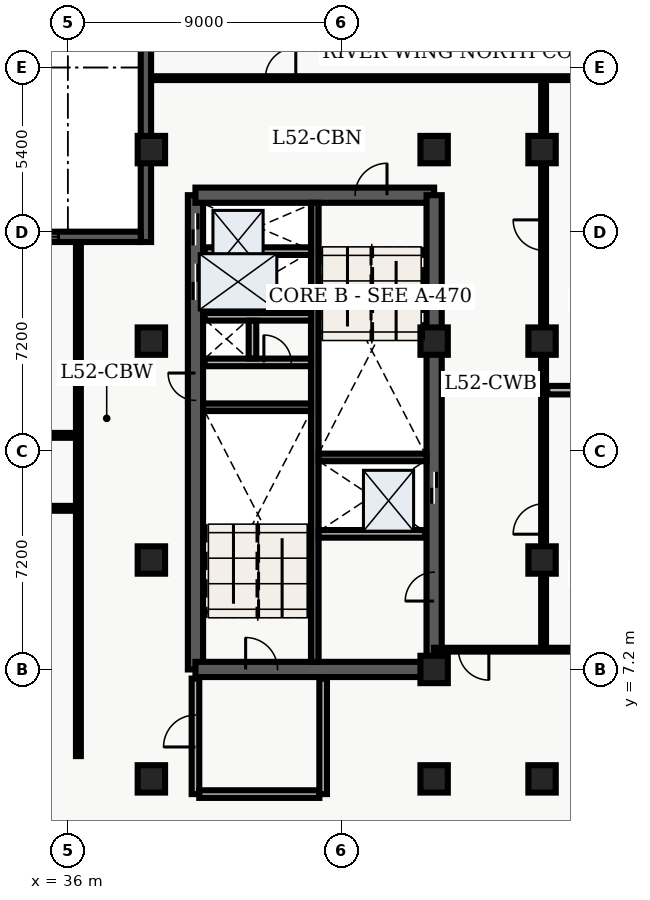
"""IFC4 building model, lengths in metres.
Left out: names, types, materials, properties, quantities, classifications, styles, units other than length and angle.
Written with IfcOpenShell. Run it as: python <this file> out.ifc"""

import sys

from ifc_helpers import new_model, entity, si_unit, converted_unit, direction, frame, origin_with_axes, origin_2d_with_axis, place, context, subcontext, project, spatial, polyline, rectangle, outline, extrude, element, fill, save


model = new_model("IFC4")
c1 = context("Model", 3, precision=1e-05, world=origin_with_axes(), true_north=direction((0.0, 1.0)))
c2 = subcontext(c1, "Body", "Model", "MODEL_VIEW")
j1 = project(units=[si_unit("LENGTHUNIT", "METRE"), converted_unit("PLANEANGLEUNIT", "DEGREE", entity("IfcPlaneAngleMeasure", 0.017), si_unit("PLANEANGLEUNIT", "RADIAN"), dimensions=[0, 0, 0, 0, 0, 0, 0])], contexts=[c1])
p1 = place(None, origin_with_axes())
s1 = spatial("IfcSite", under=j1, at=p1, CompositionType="ELEMENT")
p2 = place(p1, origin_with_axes())
s2 = spatial("IfcBuilding", under=s1, at=p2, CompositionType="ELEMENT")
p3 = place(p2, frame((0.0, 0.0, 212.1), z_axis=(0.0, 0.0, 1.0), x_axis=(1.0, 0.0, 0.0)))
s3 = spatial("IfcBuildingStorey", under=s2, at=p3, CompositionType="ELEMENT", Elevation=212.1)
p4 = place(p3, frame((40.2, 7.2, 0.0), z_axis=(0.0, 0.0, 1.0), x_axis=(0.0, 1.0, 0.0)))
e1 = element("IfcWall", 1, at=p4, inside=s3, PredefinedType="SHEAR", context=c2, shape_type="SweptSolid", body=[
    extrude(outline(polyline([(0.0, -0.25), (15.6, -0.25), (15.6, 0.25), (0.0, 0.25), (0.0, -0.25)])), origin_with_axes(), (0.0, 0.0, 1.0), 3.66),
])
p5 = place(p4, frame((14.475, 0.0, 0.0), z_axis=(0.0, 0.0, 1.0), x_axis=(1.0, 0.0, 0.0)))
e2 = element("IfcOpeningElement", 2, at=p5, cuts=e1, PredefinedType="OPENING", context=c2, shape_type="SweptSolid", body=[
    extrude(rectangle(XDim=1.05, YDim=0.52, at=origin_2d_with_axis()), origin_with_axes(), (0.0, 0.0, 1.0), 2.15),
])
p6 = place(p4, frame((12.75, 0.0, 0.0), z_axis=(0.0, 0.0, 1.0), x_axis=(1.0, 0.0, 0.0)))
e3 = element("IfcOpeningElement", 3, at=p6, cuts=e1, PredefinedType="OPENING", context=c2, shape_type="SweptSolid", body=[
    extrude(rectangle(XDim=1.2, YDim=0.52, at=origin_2d_with_axis()), origin_with_axes(), (0.0, 0.0, 1.0), 2.15),
])
p7 = place(p4, frame((9.3, 0.0, 0.0), z_axis=(0.0, 0.0, 1.0), x_axis=(1.0, 0.0, 0.0)))
e4 = element("IfcOpeningElement", 4, at=p7, cuts=e1, PredefinedType="OPENING", context=c2, shape_type="SweptSolid", body=[
    extrude(rectangle(XDim=0.9, YDim=0.52, at=origin_2d_with_axis()), origin_with_axes(), (0.0, 0.0, 1.0), 2.15),
])
p8 = place(p3, frame((40.2, 7.2, 0.0), z_axis=(0.0, 0.0, 1.0), x_axis=(1.0, 0.0, 0.0)))
e5 = element("IfcWall", 5, at=p8, inside=s3, PredefinedType="SHEAR", context=c2, shape_type="SweptSolid", body=[
    extrude(outline(polyline([(0.0, -0.25), (7.85, -0.25), (7.85, 0.25), (0.0, 0.25), (0.0, -0.25)])), origin_with_axes(), (0.0, 0.0, 1.0), 3.66),
])
p9 = place(p8, frame((2.175, 0.0, 0.0), z_axis=(0.0, 0.0, 1.0), x_axis=(1.0, 0.0, 0.0)))
e6 = element("IfcOpeningElement", 6, at=p9, cuts=e5, PredefinedType="OPENING", context=c2, shape_type="SweptSolid", body=[
    extrude(rectangle(XDim=1.05, YDim=0.52, at=origin_2d_with_axis()), origin_with_axes(), (0.0, 0.0, 1.0), 2.15),
])
p10 = place(p3, frame((40.2, 22.8, 0.0), z_axis=(0.0, 0.0, 1.0), x_axis=(1.0, 0.0, 0.0)))
e7 = element("IfcWall", 7, at=p10, inside=s3, PredefinedType="SHEAR", context=c2, shape_type="SweptSolid", body=[
    extrude(outline(polyline([(0.0, -0.25), (7.85, -0.25), (7.85, 0.25), (0.0, 0.25), (0.0, -0.25)])), origin_with_axes(), (0.0, 0.0, 1.0), 3.66),
])
p11 = place(p10, frame((5.775, 0.0, 0.0), z_axis=(0.0, 0.0, 1.0), x_axis=(1.0, 0.0, 0.0)))
e8 = element("IfcOpeningElement", 8, at=p11, cuts=e7, PredefinedType="OPENING", context=c2, shape_type="SweptSolid", body=[
    extrude(rectangle(XDim=1.05, YDim=0.52, at=origin_2d_with_axis()), origin_with_axes(), (0.0, 0.0, 1.0), 2.15),
])
p12 = place(p3, frame((48.05, 7.2, 0.0), z_axis=(0.0, 0.0, 1.0), x_axis=(0.0, 1.0, 0.0)))
e9 = element("IfcWall", 9, at=p12, inside=s3, PredefinedType="SHEAR", context=c2, shape_type="SweptSolid", body=[
    extrude(outline(polyline([(0.0, -0.25), (15.6, -0.25), (15.6, 0.25), (0.0, 0.25), (0.0, -0.25)])), origin_with_axes(), (0.0, 0.0, 1.0), 3.66),
])
p13 = place(p12, frame((5.975, 0.0, 0.0), z_axis=(0.0, 0.0, 1.0), x_axis=(1.0, 0.0, 0.0)))
e10 = element("IfcOpeningElement", 10, at=p13, cuts=e9, PredefinedType="OPENING", context=c2, shape_type="SweptSolid", body=[
    extrude(rectangle(XDim=1.05, YDim=0.52, at=origin_2d_with_axis()), origin_with_axes(), (0.0, 0.0, 1.0), 2.15),
])
p14 = place(p12, frame((2.725, 0.0, 0.0), z_axis=(0.0, 0.0, 1.0), x_axis=(1.0, 0.0, 0.0)))
e11 = element("IfcOpeningElement", 11, at=p14, cuts=e9, PredefinedType="OPENING", context=c2, shape_type="SweptSolid", body=[
    extrude(rectangle(XDim=0.95, YDim=0.52, at=origin_2d_with_axis()), origin_with_axes(), (0.0, 0.0, 1.0), 2.15),
])
p15 = place(p3, frame((44.125, 7.45, 0.0), z_axis=(0.0, 0.0, 1.0), x_axis=(0.0, 1.0, 0.0)))
e12 = element("IfcWall", 12, at=p15, inside=s3, PredefinedType="SHEAR", context=c2, shape_type="SweptSolid", body=[
    extrude(outline(polyline([(0.0, -0.125), (15.1, -0.125), (15.1, 0.125), (0.0, 0.125), (0.0, -0.125)])), origin_with_axes(), (0.0, 0.0, 1.0), 3.66),
])
for number, where, z_axis, x_axis in (
    (13, (40.45, 15.825, 0.0), (0.0, 0.0, 1.0), (1.0, 0.0, 0.0)),
    (14, (44.25, 14.175, 0.0), (0.0, 0.0, 1.0), (1.0, 0.0, 0.0)),
):
    element("IfcWall", number, at=place(p3, frame(where, z_axis=z_axis, x_axis=x_axis)), inside=s3, PredefinedType="SHEAR", context=c2, shape_type="SweptSolid", body=[
        extrude(outline(polyline([(0.0, -0.125), (3.55, -0.125), (3.55, 0.125), (0.0, 0.125), (0.0, -0.125)])), origin_with_axes(), (0.0, 0.0, 1.0), 3.66),
    ])
p16 = place(p3, frame((40.5, 17.3, 0.0), z_axis=(0.0, 0.0, 1.0), x_axis=(1.0, 0.0, 0.0)))
e15 = element("IfcWall", 15, at=p16, inside=s3, PredefinedType="SOLIDWALL", context=c2, shape_type="SweptSolid", body=[
    extrude(outline(polyline([(0.0, -0.125), (3.5, -0.125), (3.5, 0.125), (0.0, 0.125), (0.0, -0.125)])), origin_with_axes(), (0.0, 0.0, 1.0), 2.7),
])
p17 = place(p16, frame((2.4, 0.0, 0.0), z_axis=(0.0, 0.0, 1.0), x_axis=(1.0, 0.0, 0.0)))
e16 = element("IfcOpeningElement", 16, at=p17, cuts=e15, PredefinedType="OPENING", context=c2, shape_type="SweptSolid", body=[
    extrude(rectangle(XDim=0.9, YDim=0.27, at=origin_2d_with_axis()), origin_with_axes(), (0.0, 0.0, 1.0), 2.15),
])
p18 = place(p3, frame((40.5, 18.8, 0.0), z_axis=(0.0, 0.0, 1.0), x_axis=(1.0, 0.0, 0.0)))
e17 = element("IfcWall", 17, at=p18, inside=s3, PredefinedType="SOLIDWALL", context=c2, shape_type="SweptSolid", body=[
    extrude(outline(polyline([(0.0, -0.125), (3.5, -0.125), (3.5, 0.125), (0.0, 0.125), (0.0, -0.125)])), origin_with_axes(), (0.0, 0.0, 1.0), 2.7),
])
p19 = place(p3, frame((42.075, 17.43, 0.0), z_axis=(0.0, 0.0, 1.0), x_axis=(0.0, 1.0, 0.0)))
e18 = element("IfcWall", 18, at=p19, inside=s3, PredefinedType="SOLIDWALL", context=c2, shape_type="SweptSolid", body=[
    extrude(outline(polyline([(0.0, -0.125), (1.24, -0.125), (1.24, 0.125), (0.0, 0.125), (0.0, -0.125)])), origin_with_axes(), (0.0, 0.0, 1.0), 2.7),
])
p20 = place(p3, frame((40.2, 3.1, 0.0), z_axis=(0.0, 0.0, 1.0), x_axis=(0.0, 1.0, 0.0)))
e19 = element("IfcWall", 19, at=p20, inside=s3, PredefinedType="SOLIDWALL", context=c2, shape_type="SweptSolid", body=[
    extrude(outline(polyline([(0.0, -0.125), (3.8, -0.125), (3.8, 0.125), (0.0, 0.125), (0.0, -0.125)])), origin_with_axes(), (0.0, 0.0, 1.0), 2.7),
])
p21 = place(p20, frame((2.075, 0.0, 0.0), z_axis=(0.0, 0.0, 1.0), x_axis=(1.0, 0.0, 0.0)))
e20 = element("IfcOpeningElement", 20, at=p21, cuts=e19, PredefinedType="OPENING", context=c2, shape_type="SweptSolid", body=[
    extrude(rectangle(XDim=1.05, YDim=0.27, at=origin_2d_with_axis()), origin_with_axes(), (0.0, 0.0, 1.0), 2.15),
])
p22 = place(p3, frame((40.325, 3.1, 0.0), z_axis=(0.0, 0.0, 1.0), x_axis=(1.0, 0.0, 0.0)))
e21 = element("IfcWall", 21, at=p22, inside=s3, PredefinedType="SOLIDWALL", context=c2, shape_type="SweptSolid", body=[
    extrude(outline(polyline([(0.0, -0.125), (3.95, -0.125), (3.95, 0.125), (0.0, 0.125), (0.0, -0.125)])), origin_with_axes(), (0.0, 0.0, 1.0), 2.7),
])
p23 = place(p3, frame((44.4, 3.1, 0.0), z_axis=(0.0, 0.0, 1.0), x_axis=(0.0, 1.0, 0.0)))
e22 = element("IfcWall", 22, at=p23, inside=s3, PredefinedType="SOLIDWALL", context=c2, shape_type="SweptSolid", body=[
    extrude(outline(polyline([(0.0, -0.125), (3.8, -0.125), (3.8, 0.125), (0.0, 0.125), (0.0, -0.125)])), origin_with_axes(), (0.0, 0.0, 1.0), 2.7),
])
for number, where, z_axis, x_axis in (
    (23, (38.75, 3.6, 0.0), (0.0, 0.0, 1.0), (1.0, 0.0, 0.0)),
    (24, (38.75, 10.8, 0.0), (0.0, 0.0, 1.0), (1.0, 0.0, 0.0)),
    (25, (38.75, 18.0, 0.0), (0.0, 0.0, 1.0), (1.0, 0.0, 0.0)),
    (26, (38.75, 24.3, 0.0), (0.0, 0.0, 1.0), (1.0, 0.0, 0.0)),
    (27, (48.05, 3.6, 0.0), (0.0, 0.0, 1.0), (1.0, 0.0, 0.0)),
    (28, (48.05, 7.2, 0.0), (0.0, 0.0, 1.0), (1.0, 0.0, 0.0)),
    (29, (48.05, 18.0, 0.0), (0.0, 0.0, 1.0), (1.0, 0.0, 0.0)),
    (30, (48.05, 24.3, 0.0), (0.0, 0.0, 1.0), (1.0, 0.0, 0.0)),
    (31, (51.6, 3.6, 0.0), (0.0, 0.0, 1.0), (1.0, 0.0, 0.0)),
    (32, (51.6, 10.8, 0.0), (0.0, 0.0, 1.0), (1.0, 0.0, 0.0)),
    (33, (51.6, 18.0, 0.0), (0.0, 0.0, 1.0), (1.0, 0.0, 0.0)),
    (34, (51.6, 24.3, 0.0), (0.0, 0.0, 1.0), (1.0, 0.0, 0.0)),
):
    element("IfcColumn", number, at=place(p3, frame(where, z_axis=z_axis, x_axis=x_axis)), inside=s3, PredefinedType="COLUMN", context=c2, shape_type="SweptSolid", body=[
        extrude(rectangle(XDim=0.9, YDim=0.9, at=origin_2d_with_axis()), origin_with_axes(), (0.0, 0.0, 1.0), 3.9),
    ])
for number, where, z_axis, x_axis in (
    (35, (40.5, 20.96, 0.0), (0.0, 0.0, 1.0), (1.0, 0.0, 0.0)),
    (36, (44.25, 11.66, 0.0), (0.0, 0.0, 1.0), (1.0, 0.0, 0.0)),
):
    element("IfcWall", number, at=place(p3, frame(where, z_axis=z_axis, x_axis=x_axis)), inside=s3, PredefinedType="SOLIDWALL", context=c2, shape_type="SweptSolid", body=[
        extrude(outline(polyline([(0.0, -0.125), (3.5, -0.125), (3.5, 0.125), (0.0, 0.125), (0.0, -0.125)])), origin_with_axes(), (0.0, 0.0, 1.0), 2.7),
    ])
p24 = place(p3, frame((21.15, 12.5, 0.0), z_axis=(0.0, 0.0, 1.0), x_axis=(1.0, 0.0, 0.0)))
e37 = element("IfcWall", 37, at=p24, inside=s3, PredefinedType="PARTITIONING", context=c2, shape_type="SweptSolid", body=[
    extrude(outline(polyline([(0.0, -0.08), (15.2, -0.08), (15.2, 0.08), (0.0, 0.08), (0.0, -0.08)])), origin_with_axes(), (0.0, 0.0, 1.0), 2.7),
])
p25 = place(p24, frame((7.65, 0.0, 0.0), z_axis=(0.0, 0.0, 1.0), x_axis=(1.0, 0.0, 0.0)))
e38 = element("IfcOpeningElement", 38, at=p25, cuts=e37, PredefinedType="OPENING", context=c2, shape_type="SweptSolid", body=[
    extrude(rectangle(XDim=1.2, YDim=0.18, at=origin_2d_with_axis()), origin_with_axes(), (0.0, 0.0, 1.0), 2.2),
])
p26 = place(p3, frame((21.15, 14.9, 0.0), z_axis=(0.0, 0.0, 1.0), x_axis=(1.0, 0.0, 0.0)))
e39 = element("IfcWall", 39, at=p26, inside=s3, PredefinedType="PARTITIONING", context=c2, shape_type="SweptSolid", body=[
    extrude(outline(polyline([(0.0, -0.08), (15.2, -0.08), (15.2, 0.08), (0.0, 0.08), (0.0, -0.08)])), origin_with_axes(), (0.0, 0.0, 1.0), 2.7),
])
p27 = place(p26, frame((1.753, 0.0, 0.0), z_axis=(0.0, 0.0, 1.0), x_axis=(1.0, 0.0, 0.0)))
e40 = element("IfcOpeningElement", 40, at=p27, cuts=e39, PredefinedType="OPENING", context=c2, shape_type="SweptSolid", body=[
    extrude(rectangle(XDim=1.0, YDim=0.18, at=origin_2d_with_axis()), origin_with_axes(), (0.0, 0.0, 1.0), 2.15),
])
p28 = place(p26, frame((4.888, 0.0, 0.0), z_axis=(0.0, 0.0, 1.0), x_axis=(1.0, 0.0, 0.0)))
e41 = element("IfcOpeningElement", 41, at=p28, cuts=e39, PredefinedType="OPENING", context=c2, shape_type="SweptSolid", body=[
    extrude(rectangle(XDim=1.0, YDim=0.18, at=origin_2d_with_axis()), origin_with_axes(), (0.0, 0.0, 1.0), 2.15),
])
p29 = place(p26, frame((8.534, 0.0, 0.0), z_axis=(0.0, 0.0, 1.0), x_axis=(1.0, 0.0, 0.0)))
e42 = element("IfcOpeningElement", 42, at=p29, cuts=e39, PredefinedType="OPENING", context=c2, shape_type="SweptSolid", body=[
    extrude(rectangle(XDim=1.0, YDim=0.18, at=origin_2d_with_axis()), origin_with_axes(), (0.0, 0.0, 1.0), 2.15),
])
p30 = place(p26, frame((12.869, 0.0, 0.0), z_axis=(0.0, 0.0, 1.0), x_axis=(1.0, 0.0, 0.0)))
e43 = element("IfcOpeningElement", 43, at=p30, cuts=e39, PredefinedType="OPENING", context=c2, shape_type="SweptSolid", body=[
    extrude(rectangle(XDim=1.2, YDim=0.18, at=origin_2d_with_axis()), origin_with_axes(), (0.0, 0.0, 1.0), 2.2),
])
p31 = place(p3, frame((36.35, 4.35, 0.0), z_axis=(0.0, 0.0, 1.0), x_axis=(0.0, 1.0, 0.0)))
e44 = element("IfcWall", 44, at=p31, inside=s3, PredefinedType="PARTITIONING", context=c2, shape_type="SweptSolid", body=[
    extrude(outline(polyline([(0.0, -0.08), (16.95, -0.08), (16.95, 0.08), (0.0, 0.08), (0.0, -0.08)])), origin_with_axes(), (0.0, 0.0, 1.0), 2.7),
])
p32 = place(p3, frame((51.65, 7.85, 0.0), z_axis=(0.0, 0.0, 1.0), x_axis=(0.0, 1.0, 0.0)))
e45 = element("IfcWall", 45, at=p32, inside=s3, PredefinedType="PARTITIONING", context=c2, shape_type="SweptSolid", body=[
    extrude(outline(polyline([(0.0, -0.08), (18.8, -0.08), (18.8, 0.08), (0.0, 0.08), (0.0, -0.08)])), origin_with_axes(), (0.0, 0.0, 1.0), 2.7),
])
p33 = place(p32, frame((4.298, 0.0, 0.0), z_axis=(0.0, 0.0, 1.0), x_axis=(1.0, 0.0, 0.0)))
e46 = element("IfcOpeningElement", 46, at=p33, cuts=e45, PredefinedType="OPENING", context=c2, shape_type="SweptSolid", body=[
    extrude(rectangle(XDim=1.0, YDim=0.18, at=origin_2d_with_axis()), origin_with_axes(), (0.0, 0.0, 1.0), 2.15),
])
p34 = place(p32, frame((13.639, 0.0, 0.0), z_axis=(0.0, 0.0, 1.0), x_axis=(1.0, 0.0, 0.0)))
e47 = element("IfcOpeningElement", 47, at=p34, cuts=e45, PredefinedType="OPENING", context=c2, shape_type="SweptSolid", body=[
    extrude(rectangle(XDim=1.0, YDim=0.18, at=origin_2d_with_axis()), origin_with_axes(), (0.0, 0.0, 1.0), 2.15),
])
p35 = place(p3, frame((59.665, 7.85, 0.0), z_axis=(0.0, 0.0, 1.0), x_axis=(-1.0, 0.0, 0.0)))
e48 = element("IfcWall", 48, at=p35, inside=s3, PredefinedType="PARTITIONING", context=c2, shape_type="SweptSolid", body=[
    extrude(outline(polyline([(0.0, -0.062), (11.615, -0.062), (11.615, 0.062), (0.0, 0.062), (0.0, -0.062)])), origin_with_axes(), (0.0, 0.0, 1.0), 2.7),
])
p36 = place(p35, frame((10.315, 0.0, 0.0), z_axis=(0.0, 0.0, 1.0), x_axis=(1.0, 0.0, 0.0)))
e49 = element("IfcOpeningElement", 49, at=p36, cuts=e48, PredefinedType="OPENING", context=c2, shape_type="SweptSolid", body=[
    extrude(rectangle(XDim=1.0, YDim=0.145, at=origin_2d_with_axis()), origin_with_axes(), (0.0, 0.0, 1.0), 2.15),
])
p37 = place(p3, frame((38.735, 26.65, 0.0), z_axis=(0.0, 0.0, 1.0), x_axis=(1.0, 0.0, 0.0)))
e50 = element("IfcWall", 50, at=p37, inside=s3, PredefinedType="PARTITIONING", context=c2, shape_type="SweptSolid", body=[
    extrude(outline(polyline([(0.0, -0.062), (20.905, -0.062), (20.905, 0.062), (0.0, 0.062), (0.0, -0.062)])), origin_with_axes(), (0.0, 0.0, 1.0), 2.7),
])
p38 = place(p37, frame((4.265, 0.0, 0.0), z_axis=(0.0, 0.0, 1.0), x_axis=(1.0, 0.0, 0.0)))
e51 = element("IfcOpeningElement", 51, at=p38, cuts=e50, PredefinedType="OPENING", context=c2, shape_type="SweptSolid", body=[
    extrude(rectangle(XDim=1.0, YDim=0.145, at=origin_2d_with_axis()), origin_with_axes(), (0.0, 0.0, 1.0), 2.15),
])
p39 = place(p3, frame((51.77, 16.387, 0.0), z_axis=(0.0, 0.0, 1.0), x_axis=(1.0, 0.0, 0.0)))
e52 = element("IfcWall", 52, at=p39, inside=s3, PredefinedType="PARTITIONING", context=c2, shape_type="SweptSolid", body=[
    extrude(outline(polyline([(0.0, -0.14), (7.895, -0.14), (7.895, 0.14), (0.0, 0.14), (0.0, -0.14)])), origin_with_axes(), (0.0, 0.0, 1.0), 2.7),
])
p40 = place(p3, frame((38.57, 21.26, 0.0), z_axis=(0.0, 0.0, 1.0), x_axis=(0.0, 1.0, 0.0)))
e53 = element("IfcWall", 53, at=p40, inside=s3, PredefinedType="SOLIDWALL", context=c2, shape_type="SweptSolid", body=[
    extrude(outline(polyline([(0.0, -0.17), (7.54, -0.17), (7.54, 0.17), (0.0, 0.17), (0.0, -0.17)])), origin_with_axes(), (0.0, 0.0, 1.0), 3.66),
])
p41 = place(p3, frame((31.185, 21.43, 0.0), z_axis=(0.0, 0.0, 1.0), x_axis=(1.0, 0.0, 0.0)))
e54 = element("IfcWall", 54, at=p41, inside=s3, PredefinedType="SOLIDWALL", context=c2, shape_type="SweptSolid", body=[
    extrude(outline(polyline([(0.0, -0.17), (7.215, -0.17), (7.215, 0.17), (0.0, 0.17), (0.0, -0.17)])), origin_with_axes(), (0.0, 0.0, 1.0), 3.66),
])
p42 = place(p41, frame((3.608, 0.0, 0.45), z_axis=(0.0, 0.0, 1.0), x_axis=(1.0, 0.0, 0.0)))
e55 = element("IfcOpeningElement", 55, at=p42, cuts=e54, PredefinedType="OPENING", context=c2, shape_type="SweptSolid", body=[
    extrude(rectangle(XDim=1.8, YDim=0.36, at=origin_2d_with_axis()), origin_with_axes(), (0.0, 0.0, 1.0), 2.1),
])
p43 = place(p12, frame((5.975, 0.0, 0.0), z_axis=(0.0, 0.0, 1.0), x_axis=(1.0, 0.0, 0.0)))
e56 = element("IfcDoor", 56, at=p43, inside=s3, OperationType="SLIDING_TO_LEFT", PredefinedType="DOOR", context=c2, shape_type="SweptSolid", body=[
    extrude(rectangle(XDim=1.05, YDim=0.09, at=origin_2d_with_axis()), origin_with_axes(), (0.0, 0.0, 1.0), 2.15),
])
fill(e10, e56)
p44 = place(p4, frame((14.475, 0.0, 0.0), z_axis=(0.0, 0.0, 1.0), x_axis=(1.0, 0.0, 0.0)))
e57 = element("IfcDoor", 57, at=p44, inside=s3, OperationType="SLIDING_TO_RIGHT", PredefinedType="DOOR", context=c2, shape_type="SweptSolid", body=[
    extrude(rectangle(XDim=1.05, YDim=0.09, at=origin_2d_with_axis()), origin_with_axes(), (0.0, 0.0, 1.0), 2.15),
])
fill(e2, e57)
p45 = place(p4, frame((12.75, 0.0, 0.0), z_axis=(0.0, 0.0, 1.0), x_axis=(1.0, 0.0, 0.0)))
e58 = element("IfcDoor", 58, at=p45, inside=s3, OperationType="DOUBLE_DOOR_SLIDING", PredefinedType="DOOR", context=c2, shape_type="SweptSolid", body=[
    extrude(rectangle(XDim=1.2, YDim=0.09, at=origin_2d_with_axis()), origin_with_axes(), (0.0, 0.0, 1.0), 2.15),
])
fill(e3, e58)
p46 = place(p4, frame((9.3, 0.0, 0.0), z_axis=(0.0, 0.0, 1.0), x_axis=(1.0, 0.0, 0.0)))
e59 = element("IfcDoor", 59, at=p46, inside=s3, OperationType="SINGLE_SWING_RIGHT", PredefinedType="DOOR", context=c2, shape_type="SweptSolid", body=[
    extrude(rectangle(XDim=0.9, YDim=0.09, at=origin_2d_with_axis()), origin_with_axes(), (0.0, 0.0, 1.0), 2.15),
])
fill(e4, e59)
p47 = place(p16, frame((2.4, 0.0, 0.0), z_axis=(0.0, 0.0, 1.0), x_axis=(1.0, 0.0, 0.0)))
e60 = element("IfcDoor", 60, at=p47, inside=s3, OperationType="SINGLE_SWING_LEFT", PredefinedType="DOOR", context=c2, shape_type="SweptSolid", body=[
    extrude(rectangle(XDim=0.9, YDim=0.09, at=origin_2d_with_axis()), origin_with_axes(), (0.0, 0.0, 1.0), 2.15),
])
fill(e16, e60)
p48 = place(p8, frame((2.175, 0.0, 0.0), z_axis=(0.0, 0.0, 1.0), x_axis=(1.0, 0.0, 0.0)))
e61 = element("IfcDoor", 61, at=p48, inside=s3, OperationType="SINGLE_SWING_LEFT", PredefinedType="DOOR", context=c2, shape_type="SweptSolid", body=[
    extrude(rectangle(XDim=1.05, YDim=0.09, at=origin_2d_with_axis()), origin_with_axes(), (0.0, 0.0, 1.0), 2.15),
])
fill(e6, e61)
p49 = place(p10, frame((5.775, 0.0, 0.0), z_axis=(0.0, 0.0, 1.0), x_axis=(1.0, 0.0, 0.0)))
e62 = element("IfcDoor", 62, at=p49, inside=s3, OperationType="SINGLE_SWING_RIGHT", PredefinedType="DOOR", context=c2, shape_type="SweptSolid", body=[
    extrude(rectangle(XDim=1.05, YDim=0.09, at=origin_2d_with_axis()), origin_with_axes(), (0.0, 0.0, 1.0), 2.15),
])
fill(e8, e62)
p50 = place(p20, frame((2.075, 0.0, 0.0), z_axis=(0.0, 0.0, 1.0), x_axis=(1.0, 0.0, 0.0)))
e63 = element("IfcDoor", 63, at=p50, inside=s3, OperationType="SINGLE_SWING_LEFT", PredefinedType="DOOR", context=c2, shape_type="SweptSolid", body=[
    extrude(rectangle(XDim=1.05, YDim=0.09, at=origin_2d_with_axis()), origin_with_axes(), (0.0, 0.0, 1.0), 2.15),
])
fill(e20, e63)
p51 = place(p12, frame((2.725, 0.0, 0.0), z_axis=(0.0, 0.0, 1.0), x_axis=(1.0, 0.0, 0.0)))
e64 = element("IfcDoor", 64, at=p51, inside=s3, OperationType="SINGLE_SWING_LEFT", PredefinedType="DOOR", context=c2, shape_type="SweptSolid", body=[
    extrude(rectangle(XDim=0.95, YDim=0.09, at=origin_2d_with_axis()), origin_with_axes(), (0.0, 0.0, 1.0), 2.15),
])
fill(e11, e64)
p52 = place(p35, frame((10.315, 0.0, 0.0), z_axis=(0.0, 0.0, 1.0), x_axis=(1.0, 0.0, 0.0)))
e65 = element("IfcDoor", 65, at=p52, inside=s3, OperationType="SINGLE_SWING_LEFT", PredefinedType="DOOR", context=c2, shape_type="SweptSolid", body=[
    extrude(rectangle(XDim=1.0, YDim=0.075, at=origin_2d_with_axis()), origin_with_axes(), (0.0, 0.0, 1.0), 2.15),
])
fill(e49, e65)
p53 = place(p37, frame((4.265, 0.0, 0.0), z_axis=(0.0, 0.0, 1.0), x_axis=(1.0, 0.0, 0.0)))
e66 = element("IfcDoor", 66, at=p53, inside=s3, OperationType="SINGLE_SWING_RIGHT", PredefinedType="DOOR", context=c2, shape_type="SweptSolid", body=[
    extrude(rectangle(XDim=1.0, YDim=0.075, at=origin_2d_with_axis()), origin_with_axes(), (0.0, 0.0, 1.0), 2.15),
])
fill(e51, e66)
p54 = place(p32, frame((4.298, 0.0, 0.0), z_axis=(0.0, 0.0, 1.0), x_axis=(1.0, 0.0, 0.0)))
e67 = element("IfcDoor", 67, at=p54, inside=s3, OperationType="SINGLE_SWING_LEFT", PredefinedType="DOOR", context=c2, shape_type="SweptSolid", body=[
    extrude(rectangle(XDim=1.0, YDim=0.09, at=origin_2d_with_axis()), origin_with_axes(), (0.0, 0.0, 1.0), 2.15),
])
fill(e46, e67)
p55 = place(p32, frame((13.639, 0.0, 0.0), z_axis=(0.0, 0.0, 1.0), x_axis=(1.0, 0.0, 0.0)))
e68 = element("IfcDoor", 68, at=p55, inside=s3, OperationType="SINGLE_SWING_RIGHT", PredefinedType="DOOR", context=c2, shape_type="SweptSolid", body=[
    extrude(rectangle(XDim=1.0, YDim=0.09, at=origin_2d_with_axis()), origin_with_axes(), (0.0, 0.0, 1.0), 2.15),
])
fill(e47, e68)
p56 = place(p41, frame((3.608, 0.0, 0.45), z_axis=(0.0, 0.0, 1.0), x_axis=(1.0, 0.0, 0.0)))
e69 = element("IfcWindow", 69, at=p56, inside=s3, PredefinedType="WINDOW", context=c2, shape_type="SweptSolid", body=[
    extrude(rectangle(XDim=1.8, YDim=0.09, at=origin_2d_with_axis()), origin_with_axes(), (0.0, 0.0, 1.0), 2.1),
])
fill(e55, e69)
save(model, sys.argv[1])
